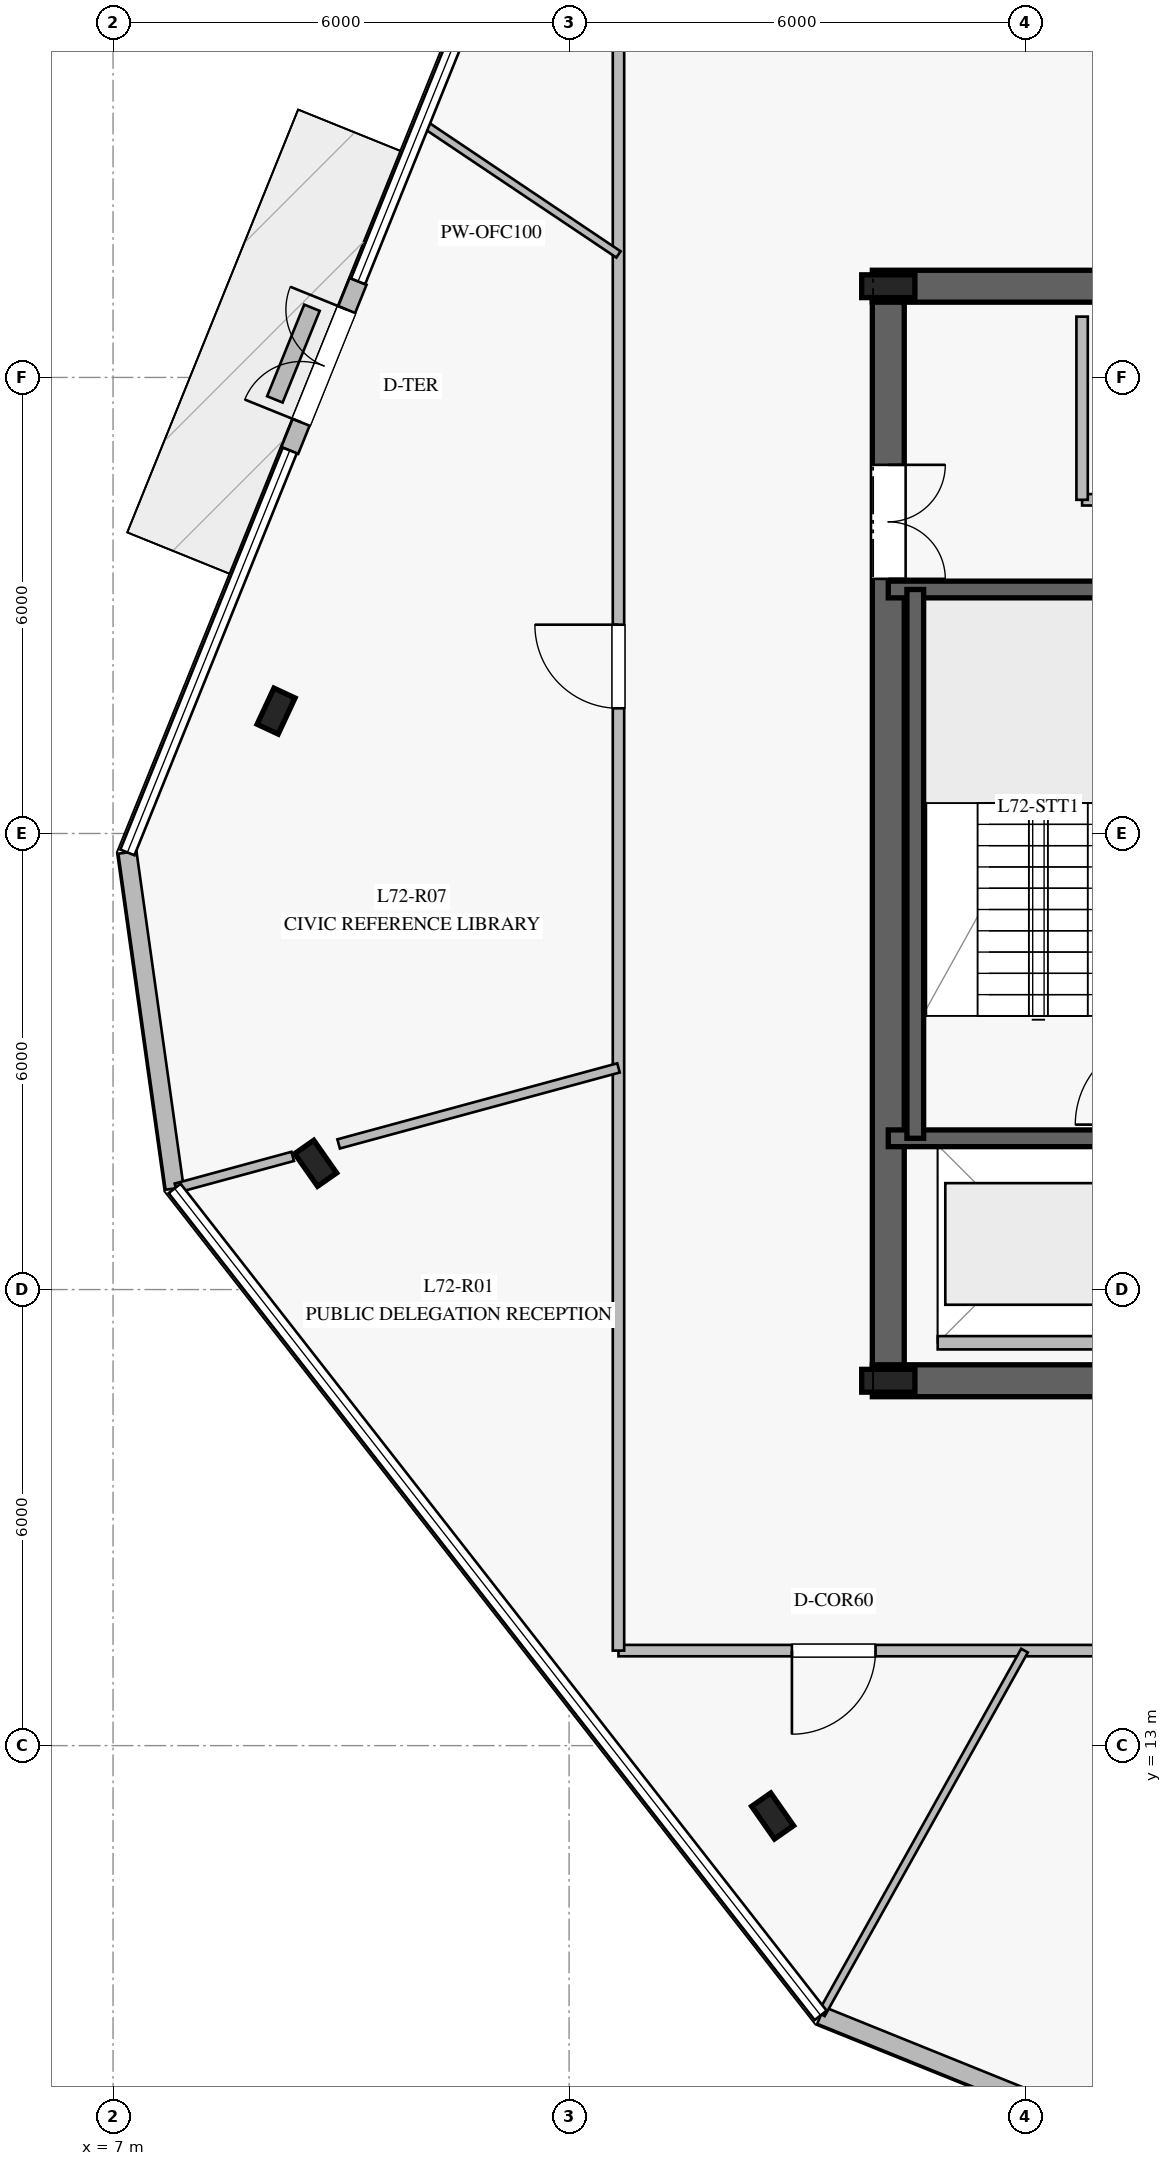
"""IFC4 building model, lengths in metres.
Left out: names, types, materials, properties, quantities, classifications, styles, units other than length and angle.
Written with IfcOpenShell. Run it as: python <this file> out.ifc"""

import sys

from ifc_helpers import new_model, si_unit, direction, frame, frame_2d, origin, origin_2d, place, context, subcontext, project, spatial, rectangle, i_section, extrude, element, fill, save


model = new_model("IFC4")
c1 = context("Model", 3, precision=1e-05, world=origin(), true_north=direction((0.0, 1.0)))
c2 = subcontext(c1, "Body", "Model", "MODEL_VIEW")
j1 = project(units=[si_unit("LENGTHUNIT", "METRE"), si_unit("PLANEANGLEUNIT", "RADIAN")], contexts=[c1])
p1 = place(None, origin())
s1 = spatial("IfcSite", under=j1, at=p1, CompositionType="ELEMENT")
p2 = place(p1, origin())
s2 = spatial("IfcBuilding", under=s1, at=p2, CompositionType="ELEMENT")
p3 = place(p2, frame((0.0, 0.0, 298.2)))
s3 = spatial("IfcBuildingStorey", under=s2, at=p3, CompositionType="ELEMENT", Elevation=298.2)
p4 = place(p3, frame((16.99, 17.8, 0.0), z_axis=(0.0, 0.0, 1.0), x_axis=(1.0, 0.0, 0.0)))
e1 = element("IfcWall", 1, at=p4, inside=s3, PredefinedType="SHEAR", context=c2, shape_type="SweptSolid", body=[
    extrude(rectangle(XDim=16.02, YDim=0.42, at=frame_2d((8.01, 0.0))), origin(), (0.0, 0.0, 1.0), 3.78),
])
p5 = place(p4, frame((4.96, 0.0, 0.0)))
e2 = element("IfcOpeningElement", 2, at=p5, cuts=e1, PredefinedType="OPENING", context=c2, shape_type="SweptSolid", body=[
    extrude(rectangle(XDim=1.2, YDim=2.25, at=frame_2d((0.6, 1.125))), frame((0.0, 0.22, 0.0), z_axis=(0.0, -1.0, 0.0), x_axis=(1.0, 0.0, 0.0)), (0.0, 0.0, 1.0), 0.44),
])
p6 = place(p4, frame((13.91, 0.0, 0.0)))
e3 = element("IfcOpeningElement", 3, at=p6, cuts=e1, PredefinedType="OPENING", context=c2, shape_type="SweptSolid", body=[
    extrude(rectangle(XDim=0.9, YDim=2.1, at=frame_2d((0.45, 1.05))), frame((0.0, 0.22, 0.0), z_axis=(0.0, -1.0, 0.0), x_axis=(1.0, 0.0, 0.0)), (0.0, 0.0, 1.0), 0.44),
])
p7 = place(p4, frame((9.785, 0.0, 0.0)))
e4 = element("IfcOpeningElement", 4, at=p7, cuts=e1, PredefinedType="OPENING", context=c2, shape_type="SweptSolid", body=[
    extrude(rectangle(XDim=1.1, YDim=2.2, at=frame_2d((0.55, 1.1))), frame((0.0, 0.22, 0.0), z_axis=(0.0, -1.0, 0.0), x_axis=(1.0, 0.0, 0.0)), (0.0, 0.0, 1.0), 0.44),
])
p8 = place(p3, frame((33.01, 32.2, 0.0), z_axis=(0.0, 0.0, 1.0), x_axis=(-1.0, 0.0, 0.0)))
e5 = element("IfcWall", 5, at=p8, inside=s3, PredefinedType="SHEAR", context=c2, shape_type="SweptSolid", body=[
    extrude(rectangle(XDim=16.02, YDim=0.42, at=frame_2d((8.01, 0.0))), origin(), (0.0, 0.0, 1.0), 3.78),
])
p9 = place(p8, frame((4.96, 0.0, 0.0)))
e6 = element("IfcOpeningElement", 6, at=p9, cuts=e5, PredefinedType="OPENING", context=c2, shape_type="SweptSolid", body=[
    extrude(rectangle(XDim=1.2, YDim=2.25, at=frame_2d((0.6, 1.125))), frame((0.0, 0.22, 0.0), z_axis=(0.0, -1.0, 0.0), x_axis=(1.0, 0.0, 0.0)), (0.0, 0.0, 1.0), 0.44),
])
p10 = place(p8, frame((9.785, 0.0, 0.0)))
e7 = element("IfcOpeningElement", 7, at=p10, cuts=e5, PredefinedType="OPENING", context=c2, shape_type="SweptSolid", body=[
    extrude(rectangle(XDim=1.1, YDim=2.2, at=frame_2d((0.55, 1.1))), frame((0.0, 0.22, 0.0), z_axis=(0.0, -1.0, 0.0), x_axis=(1.0, 0.0, 0.0)), (0.0, 0.0, 1.0), 0.44),
])
p11 = place(p3, frame((17.2, 31.99, 0.0), z_axis=(0.0, 0.0, 1.0), x_axis=(0.0, -1.0, 0.0)))
e8 = element("IfcWall", 8, at=p11, inside=s3, PredefinedType="SHEAR", context=c2, shape_type="SweptSolid", body=[
    extrude(rectangle(XDim=13.98, YDim=0.42, at=frame_2d((6.99, 0.0))), origin(), (0.0, 0.0, 1.0), 3.78),
])
p12 = place(p11, frame((2.14, 0.0, 0.0)))
e9 = element("IfcOpeningElement", 9, at=p12, cuts=e8, PredefinedType="OPENING", context=c2, shape_type="SweptSolid", body=[
    extrude(rectangle(XDim=1.5, YDim=2.2, at=frame_2d((0.75, 1.1))), frame((0.0, 0.22, 0.0), z_axis=(0.0, -1.0, 0.0), x_axis=(1.0, 0.0, 0.0)), (0.0, 0.0, 1.0), 0.44),
])
for number, where, z_axis, x_axis in (
    (10, (17.2, 17.8, 0.0), (0.0, 0.0, 1.0), (1.0, 0.0, 0.0)),
    (11, (17.2, 32.2, 0.0), (0.0, 0.0, 1.0), (1.0, 0.0, 0.0)),
):
    element("IfcColumn", number, at=place(p3, frame(where, z_axis=z_axis, x_axis=x_axis)), inside=s3, PredefinedType="COLUMN", context=c2, shape_type="SweptSolid", body=[
        extrude(i_section(OverallWidth=0.3, OverallDepth=0.7, WebThickness=0.017, FlangeThickness=0.032, at=origin_2d()), origin(), (0.0, 0.0, 1.0), 4.0),
    ])
for number, where, z_axis, x_axis in (
    (12, (17.2, 20.99, 0.0), (0.0, 0.0, 1.0), (1.0, 0.0, 0.0)),
    (13, (17.2, 28.21, 0.0), (0.0, 0.0, 1.0), (1.0, 0.0, 0.0)),
):
    element("IfcWall", number, at=place(p3, frame(where, z_axis=z_axis, x_axis=x_axis)), inside=s3, PredefinedType="SOLIDWALL", context=c2, shape_type="SweptSolid", body=[
        extrude(rectangle(XDim=3.72, YDim=0.22, at=frame_2d((1.86, 0.0))), origin(), (0.0, 0.0, 1.0), 3.78),
    ])
p13 = place(p3, frame((17.555, 28.21, 0.0), z_axis=(0.0, 0.0, 1.0), x_axis=(0.0, -1.0, 0.0)))
e14 = element("IfcWall", 14, at=p13, inside=s3, PredefinedType="SOLIDWALL", context=c2, shape_type="SweptSolid", body=[
    extrude(rectangle(XDim=7.22, YDim=0.22, at=frame_2d((3.61, 0.0))), origin(), (0.0, 0.0, 1.0), 3.78),
])
for number, where, z_axis, x_axis in (
    (15, (9.145, 26.61, 0.0), (0.0, 0.0, 1.0), (0.423, 0.906, 0.0)),
    (16, (9.666, 20.661, 0.0), (0.0, 0.0, 1.0), (-0.574, 0.819, 0.0)),
    (17, (15.678, 12.074, 0.0), (0.0, 0.0, 1.0), (-0.574, 0.819, 0.0)),
):
    element("IfcColumn", number, at=place(p3, frame(where, z_axis=z_axis, x_axis=x_axis)), inside=s3, PredefinedType="COLUMN", context=c2, shape_type="SweptSolid", body=[
        extrude(i_section(OverallWidth=0.306, OverallDepth=0.524, WebThickness=0.021, FlangeThickness=0.04, at=origin_2d()), origin(), (0.0, 0.0, 1.0), 4.0),
    ])
p14 = place(p3, frame((10.224, 32.264, 0.0), z_axis=(0.0, 0.0, 1.0), x_axis=(-0.374703586724, -0.927144660825, 0.0)))
e18 = element("IfcWall", 18, at=p14, inside=s3, PredefinedType="STANDARD", context=c2, shape_type="SweptSolid", body=[
    extrude(rectangle(XDim=2.4, YDim=0.24, at=frame_2d((1.2, 0.0))), origin(), (0.0, 0.0, 1.0), 3.78),
])
p15 = place(p14, frame((0.4, 0.0, 0.0)))
e19 = element("IfcOpeningElement", 19, at=p15, cuts=e18, PredefinedType="OPENING", context=c2, shape_type="SweptSolid", body=[
    extrude(rectangle(XDim=1.6, YDim=2.25, at=frame_2d((0.8, 1.125))), frame((0.0, 0.13, 0.0), z_axis=(0.0, -1.0, 0.0), x_axis=(1.0, 0.0, 0.0)), (0.0, 0.0, 1.0), 0.26),
])
p16 = place(p3, frame((7.189, 24.751, 0.0), z_axis=(0.0, 0.0, 1.0), x_axis=(0.139124115192, -0.990274952007, 0.0)))
e20 = element("IfcWall", 20, at=p16, inside=s3, PredefinedType="STANDARD", context=c2, shape_type="SweptSolid", body=[
    extrude(rectangle(XDim=4.464, YDim=0.24, at=frame_2d((2.232, 0.0))), origin(), (0.0, 0.0, 1.0), 3.78),
])
p17 = place(p3, frame((16.31, 9.451, 0.0), z_axis=(0.0, 0.0, 1.0), x_axis=(0.927166243324, -0.374650179823, 0.0)))
e21 = element("IfcWall", 21, at=p17, inside=s3, PredefinedType="STANDARD", context=c2, shape_type="SweptSolid", body=[
    extrude(rectangle(XDim=4.465, YDim=0.24, at=frame_2d((2.232, 0.0))), origin(), (0.0, 0.0, 1.0), 3.78),
])
p18 = place(p3, frame((9.617, 31.917, 0.0), z_axis=(0.0, 0.0, 1.0), x_axis=(-0.375108300877, -0.926980993663, 0.0)))
e22 = element("IfcWall", 22, at=p18, inside=s3, PredefinedType="USERDEFINED", context=c2, shape_type="SweptSolid", body=[
    extrude(rectangle(XDim=1.301, YDim=0.22, at=frame_2d((0.65, 0.0))), origin(), (0.0, 0.0, 1.0), 0.4),
])
p19 = place(p3, frame((19.75, 29.39, 0.0), z_axis=(0.0, 0.0, 1.0), x_axis=(1.0, 0.0, 0.0)))
e23 = element("IfcWall", 23, at=p19, inside=s3, PredefinedType="PARTITIONING", context=c2, shape_type="SweptSolid", body=[
    extrude(rectangle(XDim=5.9, YDim=0.15, at=frame_2d((2.95, 0.0))), origin(), (0.0, 0.0, 1.0), 3.78),
])
p20 = place(p3, frame((19.75, 29.39, 0.0), z_axis=(0.0, 0.0, 1.0), x_axis=(0.0, 1.0, 0.0)))
e24 = element("IfcWall", 24, at=p20, inside=s3, PredefinedType="PARTITIONING", context=c2, shape_type="SweptSolid", body=[
    extrude(rectangle(XDim=2.41, YDim=0.15, at=frame_2d((1.205, 0.0))), origin(), (0.0, 0.0, 1.0), 3.78),
])
p21 = place(p3, frame((17.85, 18.3, 0.0), z_axis=(0.0, 0.0, 1.0), x_axis=(1.0, 0.0, 0.0)))
e25 = element("IfcWall", 25, at=p21, inside=s3, PredefinedType="PARTITIONING", context=c2, shape_type="SweptSolid", body=[
    extrude(rectangle(XDim=2.6, YDim=0.175, at=frame_2d((1.3, 0.0))), origin(), (0.0, 0.0, 1.0), 3.78),
])
p22 = place(p3, frame((36.35, 14.25, 0.0), z_axis=(0.0, 0.0, 1.0), x_axis=(-1.0, 0.0, 0.0)))
e26 = element("IfcWall", 26, at=p22, inside=s3, PredefinedType="PARTITIONING", context=c2, shape_type="SweptSolid", body=[
    extrude(rectangle(XDim=22.7, YDim=0.15, at=frame_2d((11.35, 0.0))), origin(), (0.0, 0.0, 1.0), 3.28),
])
p23 = place(p22, frame((19.318, 0.0, 0.0)))
e27 = element("IfcOpeningElement", 27, at=p23, cuts=e26, PredefinedType="OPENING", context=c2, shape_type="SweptSolid", body=[
    extrude(rectangle(XDim=1.1, YDim=2.2, at=frame_2d((0.55, 1.1))), frame((0.0, 0.085, 0.0), z_axis=(0.0, -1.0, 0.0), x_axis=(1.0, 0.0, 0.0)), (0.0, 0.0, 1.0), 0.17),
])
p24 = place(p22, frame((10.598, 0.0, 0.0)))
e28 = element("IfcOpeningElement", 28, at=p24, cuts=e26, PredefinedType="OPENING", context=c2, shape_type="SweptSolid", body=[
    extrude(rectangle(XDim=1.1, YDim=2.2, at=frame_2d((0.55, 1.1))), frame((0.0, 0.085, 0.0), z_axis=(0.0, -1.0, 0.0), x_axis=(1.0, 0.0, 0.0)), (0.0, 0.0, 1.0), 0.17),
])
p25 = place(p3, frame((13.65, 14.25, 0.0), z_axis=(0.0, 0.0, 1.0), x_axis=(0.0, 1.0, 0.0)))
e29 = element("IfcWall", 29, at=p25, inside=s3, PredefinedType="PARTITIONING", context=c2, shape_type="SweptSolid", body=[
    extrude(rectangle(XDim=21.5, YDim=0.15, at=frame_2d((10.75, 0.0))), origin(), (0.0, 0.0, 1.0), 3.25),
])
p26 = place(p25, frame((12.397, 0.0, 0.0)))
e30 = element("IfcOpeningElement", 30, at=p26, cuts=e29, PredefinedType="OPENING", context=c2, shape_type="SweptSolid", body=[
    extrude(rectangle(XDim=1.1, YDim=2.2, at=frame_2d((0.55, 1.1))), frame((0.0, 0.085, 0.0), z_axis=(0.0, -1.0, 0.0), x_axis=(1.0, 0.0, 0.0)), (0.0, 0.0, 1.0), 0.17),
])
p27 = place(p3, frame((13.65, 32.618, 0.0), z_axis=(0.0, 0.0, 1.0), x_axis=(-0.830322330951, 0.55728343482, 0.0)))
e31 = element("IfcWall", 31, at=p27, inside=s3, PredefinedType="MOVABLE", context=c2, shape_type="SweptSolid", body=[
    extrude(rectangle(XDim=3.094, YDim=0.1, at=frame_2d((1.547, 0.0))), origin(), (0.0, 0.0, 1.0), 3.28),
])
p28 = place(p3, frame((13.65, 21.916, 0.0), z_axis=(0.0, 0.0, 1.0), x_axis=(-0.96503943316, -0.262104735642, 0.0)))
e32 = element("IfcWall", 32, at=p28, inside=s3, PredefinedType="PARTITIONING", context=c2, shape_type="SweptSolid", body=[
    extrude(rectangle(XDim=3.815, YDim=0.125, at=frame_2d((1.908, 0.0))), origin(), (0.0, 0.0, 1.0), 3.42),
])
p29 = place(p3, frame((9.364, 20.752, 0.0), z_axis=(0.0, 0.0, 1.0), x_axis=(-0.964961614491, -0.262391087041, 0.0)))
e33 = element("IfcWall", 33, at=p29, inside=s3, PredefinedType="PARTITIONING", context=c2, shape_type="SweptSolid", body=[
    extrude(rectangle(XDim=1.593, YDim=0.125, at=frame_2d((0.796, 0.0))), origin(), (0.0, 0.0, 1.0), 3.28),
])
p30 = place(p3, frame((18.992, 14.25, 0.0), z_axis=(0.0, 0.0, 1.0), x_axis=(-0.487748464392, -0.87298421262, 0.0)))
e34 = element("IfcWall", 34, at=p30, inside=s3, PredefinedType="MOVABLE", context=c2, shape_type="SweptSolid", body=[
    extrude(rectangle(XDim=5.48, YDim=0.1, at=frame_2d((2.74, 0.0))), origin(), (0.0, 0.0, 1.0), 3.28),
])
p31 = place(p15, frame((1.6, 0.0, 0.0), z_axis=(0.0, 0.0, 1.0), x_axis=(-1.0, 0.0, 0.0)))
e35 = element("IfcDoor", 35, at=p31, inside=s3, OperationType="DOUBLE_DOOR_SINGLE_SWING", PredefinedType="DOOR", context=c2, shape_type="SweptSolid", body=[
    extrude(rectangle(XDim=1.6, YDim=2.25, at=frame_2d((0.8, 1.125))), frame((0.0, 0.025, 0.0), z_axis=(0.0, -1.0, 0.0), x_axis=(1.0, 0.0, 0.0)), (0.0, 0.0, 1.0), 0.05),
])
fill(e19, e35)
p32 = place(p12, origin())
e36 = element("IfcDoor", 36, at=p32, inside=s3, OperationType="DOUBLE_DOOR_SINGLE_SWING", PredefinedType="DOOR", context=c2, shape_type="SweptSolid", body=[
    extrude(rectangle(XDim=1.5, YDim=2.2, at=frame_2d((0.75, 1.1))), frame((0.0, 0.025, 0.0), z_axis=(0.0, -1.0, 0.0), x_axis=(1.0, 0.0, 0.0)), (0.0, 0.0, 1.0), 0.05),
])
fill(e9, e36)
p33 = place(p23, origin())
e37 = element("IfcDoor", 37, at=p33, inside=s3, OperationType="SINGLE_SWING_RIGHT", PredefinedType="DOOR", context=c2, shape_type="SweptSolid", body=[
    extrude(rectangle(XDim=1.1, YDim=2.2, at=frame_2d((0.55, 1.1))), frame((0.0, 0.025, 0.0), z_axis=(0.0, -1.0, 0.0), x_axis=(1.0, 0.0, 0.0)), (0.0, 0.0, 1.0), 0.05),
])
fill(e27, e37)
p34 = place(p26, origin())
e38 = element("IfcDoor", 38, at=p34, inside=s3, OperationType="SINGLE_SWING_RIGHT", PredefinedType="DOOR", context=c2, shape_type="SweptSolid", body=[
    extrude(rectangle(XDim=1.1, YDim=2.2, at=frame_2d((0.55, 1.1))), frame((0.0, 0.025, 0.0), z_axis=(0.0, -1.0, 0.0), x_axis=(1.0, 0.0, 0.0)), (0.0, 0.0, 1.0), 0.05),
])
fill(e30, e38)
save(model, sys.argv[1])
